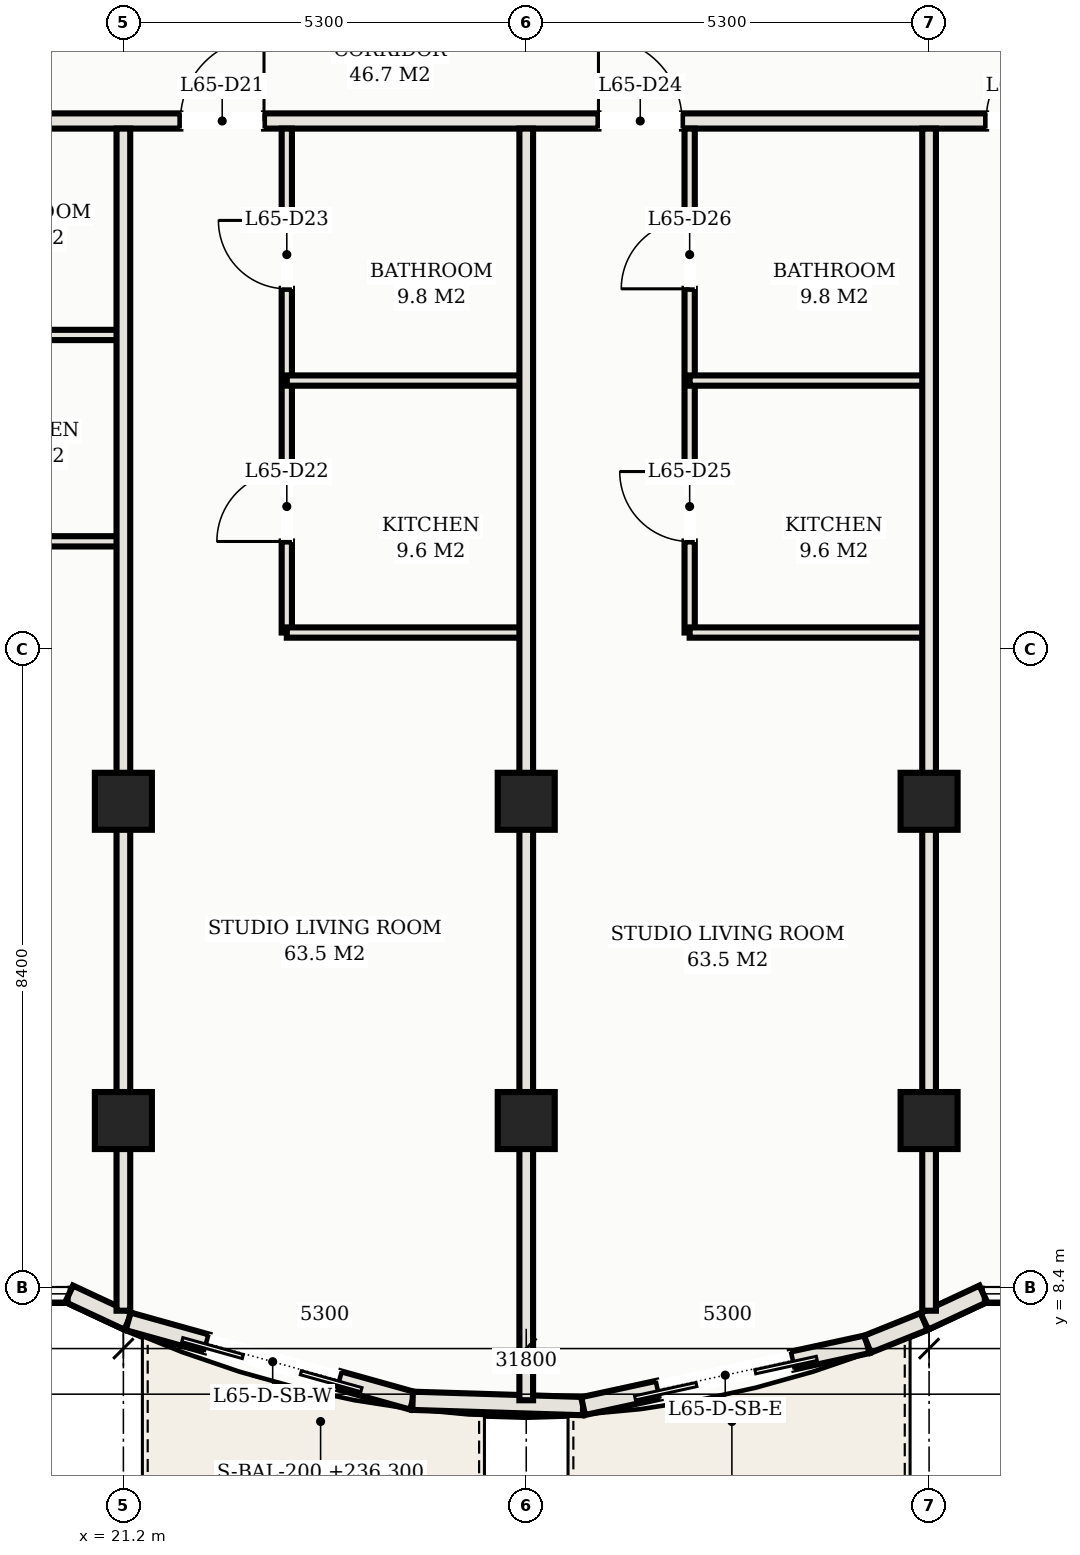
"""IFC4 building model, lengths in metres.
Left out: names, types, materials, properties, quantities, classifications, styles, units other than length and angle.
Written with IfcOpenShell. Run it as: python <this file> out.ifc"""

import sys

from ifc_helpers import new_model, si_unit, direction, frame, frame_2d, origin, origin_2d, place, context, subcontext, project, spatial, rectangle, hollow_rectangle, extrude, element, fill, save


model = new_model("IFC4")
c1 = context("Model", 3, precision=1e-05, world=origin(), true_north=direction((0.0, 1.0)))
c2 = subcontext(c1, "Body", "Model", "MODEL_VIEW")
j1 = project(units=[si_unit("LENGTHUNIT", "METRE"), si_unit("PLANEANGLEUNIT", "RADIAN")], contexts=[c1])
p1 = place(None, origin())
s1 = spatial("IfcSite", under=j1, at=p1, CompositionType="ELEMENT")
p2 = place(p1, origin())
s2 = spatial("IfcBuilding", under=s1, at=p2, CompositionType="ELEMENT")
p3 = place(p2, frame((0.0, 0.0, 236.3)))
s3 = spatial("IfcBuildingStorey", under=s2, at=p3, CompositionType="ELEMENT", Elevation=236.3)
for number, where, z_axis, x_axis in (
    (1, (21.2, 14.8, 0.0), (0.0, 0.0, 1.0), (1.0, 0.0, 0.0)),
    (2, (21.2, 10.6, 0.0), (0.0, 0.0, 1.0), (1.0, 0.0, 0.0)),
    (3, (26.5, 14.8, 0.0), (0.0, 0.0, 1.0), (1.0, 0.0, 0.0)),
    (4, (26.5, 10.6, 0.0), (0.0, 0.0, 1.0), (1.0, 0.0, 0.0)),
    (5, (31.8, 14.8, 0.0), (0.0, 0.0, 1.0), (1.0, 0.0, 0.0)),
    (6, (31.8, 10.6, 0.0), (0.0, 0.0, 1.0), (1.0, 0.0, 0.0)),
):
    element("IfcColumn", number, at=place(p3, frame(where, z_axis=z_axis, x_axis=x_axis)), inside=s3, PredefinedType="COLUMN", context=c2, shape_type="SweptSolid", body=[
        extrude(hollow_rectangle(XDim=0.75, YDim=0.75, WallThickness=0.025, at=origin_2d()), origin(), (0.0, 0.0, 1.0), 3.3),
    ])
p4 = place(p3, frame((20.487, 8.32, 0.0), z_axis=(0.0, 0.0, 1.0), x_axis=(0.906190424584, -0.422869855147, 0.0)))
e7 = element("IfcWall", 7, at=p4, inside=s3, PredefinedType="SOLIDWALL", context=c2, shape_type="SweptSolid", body=[
    extrude(rectangle(XDim=0.856, YDim=0.24, at=frame_2d((0.428, 0.0))), origin(), (0.0, 0.0, 1.0), 3.11),
])
p5 = place(p3, frame((21.263, 7.958, 0.0), z_axis=(0.0, 0.0, 1.0), x_axis=(0.963152398068, -0.268956238255, 0.0)))
e8 = element("IfcWall", 8, at=p5, inside=s3, PredefinedType="SOLIDWALL", context=c2, shape_type="SweptSolid", body=[
    extrude(rectangle(XDim=3.885, YDim=0.24, at=frame_2d((1.942, 0.0))), origin(), (0.0, 0.0, 1.0), 3.11),
])
p6 = place(p5, frame((1.074, 0.0, 0.0)))
e9 = element("IfcOpeningElement", 9, at=p6, cuts=e8, PredefinedType="OPENING", context=c2, shape_type="SweptSolid", body=[
    extrude(rectangle(XDim=1.8, YDim=2.2, at=frame_2d((0.9, 1.1))), frame((0.0, 0.13, 0.0), z_axis=(0.0, -1.0, 0.0), x_axis=(1.0, 0.0, 0.0)), (0.0, 0.0, 1.0), 0.26),
])
p7 = place(p3, frame((25.005, 6.913, 0.0), z_axis=(0.0, 0.0, 1.0), x_axis=(0.99951250052, -0.031221167572, 0.0)))
e10 = element("IfcWall", 10, at=p7, inside=s3, PredefinedType="SOLIDWALL", context=c2, shape_type="SweptSolid", body=[
    extrude(rectangle(XDim=2.244, YDim=0.24, at=frame_2d((1.122, 0.0))), origin(), (0.0, 0.0, 1.0), 3.11),
])
p8 = place(p3, frame((27.248, 6.843, 0.0), z_axis=(0.0, 0.0, 1.0), x_axis=(0.977126252677, 0.212660025225, 0.0)))
e11 = element("IfcWall", 11, at=p8, inside=s3, PredefinedType="SOLIDWALL", context=c2, shape_type="SweptSolid", body=[
    extrude(rectangle(XDim=3.828, YDim=0.24, at=frame_2d((1.914, 0.0))), origin(), (0.0, 0.0, 1.0), 3.11),
])
p9 = place(p8, frame((1.014, 0.0, 0.0)))
e12 = element("IfcOpeningElement", 12, at=p9, cuts=e11, PredefinedType="OPENING", context=c2, shape_type="SweptSolid", body=[
    extrude(rectangle(XDim=1.8, YDim=2.2, at=frame_2d((0.9, 1.1))), frame((0.0, 0.13, 0.0), z_axis=(0.0, -1.0, 0.0), x_axis=(1.0, 0.0, 0.0)), (0.0, 0.0, 1.0), 0.26),
])
p10 = place(p3, frame((30.988, 7.657, 0.0), z_axis=(0.0, 0.0, 1.0), x_axis=(0.927870589467, 0.372902358805, 0.0)))
e13 = element("IfcWall", 13, at=p10, inside=s3, PredefinedType="SOLIDWALL", context=c2, shape_type="SweptSolid", body=[
    extrude(rectangle(XDim=0.807, YDim=0.24, at=frame_2d((0.404, 0.0))), origin(), (0.0, 0.0, 1.0), 3.11),
])
p11 = place(p3, frame((31.737, 7.958, 0.0), z_axis=(0.0, 0.0, 1.0), x_axis=(0.906190424584, 0.422869855147, 0.0)))
e14 = element("IfcWall", 14, at=p11, inside=s3, PredefinedType="SOLIDWALL", context=c2, shape_type="SweptSolid", body=[
    extrude(rectangle(XDim=0.856, YDim=0.24, at=frame_2d((0.428, 0.0))), origin(), (0.0, 0.0, 1.0), 3.11),
])
p12 = place(p3, frame((8.6, 23.75, 0.0), z_axis=(0.0, 0.0, 1.0), x_axis=(1.0, 0.0, 0.0)))
e15 = element("IfcWall", 15, at=p12, inside=s3, PredefinedType="PARTITIONING", context=c2, shape_type="SweptSolid", body=[
    extrude(rectangle(XDim=35.8, YDim=0.2, at=frame_2d((17.9, 0.0))), origin(), (0.0, 0.0, 1.0), 2.45),
])
p13 = place(p12, frame((2.75, 0.0, 0.0)))
e16 = element("IfcOpeningElement", 16, at=p13, cuts=e15, PredefinedType="OPENING", context=c2, shape_type="SweptSolid", body=[
    extrude(rectangle(XDim=1.1, YDim=2.25, at=frame_2d((0.55, 1.125))), frame((0.0, 0.11, 0.0), z_axis=(0.0, -1.0, 0.0), x_axis=(1.0, 0.0, 0.0)), (0.0, 0.0, 1.0), 0.22),
])
p14 = place(p12, frame((8.05, 0.0, 0.0)))
e17 = element("IfcOpeningElement", 17, at=p14, cuts=e15, PredefinedType="OPENING", context=c2, shape_type="SweptSolid", body=[
    extrude(rectangle(XDim=1.1, YDim=2.25, at=frame_2d((0.55, 1.125))), frame((0.0, 0.11, 0.0), z_axis=(0.0, -1.0, 0.0), x_axis=(1.0, 0.0, 0.0)), (0.0, 0.0, 1.0), 0.22),
])
p15 = place(p12, frame((13.35, 0.0, 0.0)))
e18 = element("IfcOpeningElement", 18, at=p15, cuts=e15, PredefinedType="OPENING", context=c2, shape_type="SweptSolid", body=[
    extrude(rectangle(XDim=1.1, YDim=2.25, at=frame_2d((0.55, 1.125))), frame((0.0, 0.11, 0.0), z_axis=(0.0, -1.0, 0.0), x_axis=(1.0, 0.0, 0.0)), (0.0, 0.0, 1.0), 0.22),
])
p16 = place(p12, frame((18.85, 0.0, 0.0)))
e19 = element("IfcOpeningElement", 19, at=p16, cuts=e15, PredefinedType="OPENING", context=c2, shape_type="SweptSolid", body=[
    extrude(rectangle(XDim=1.1, YDim=2.25, at=frame_2d((0.55, 1.125))), frame((0.0, 0.11, 0.0), z_axis=(0.0, -1.0, 0.0), x_axis=(1.0, 0.0, 0.0)), (0.0, 0.0, 1.0), 0.22),
])
p17 = place(p12, frame((23.95, 0.0, 0.0)))
e20 = element("IfcOpeningElement", 20, at=p17, cuts=e15, PredefinedType="OPENING", context=c2, shape_type="SweptSolid", body=[
    extrude(rectangle(XDim=1.1, YDim=2.25, at=frame_2d((0.55, 1.125))), frame((0.0, 0.11, 0.0), z_axis=(0.0, -1.0, 0.0), x_axis=(1.0, 0.0, 0.0)), (0.0, 0.0, 1.0), 0.22),
])
p18 = place(p12, frame((29.25, 0.0, 0.0)))
e21 = element("IfcOpeningElement", 21, at=p18, cuts=e15, PredefinedType="OPENING", context=c2, shape_type="SweptSolid", body=[
    extrude(rectangle(XDim=1.1, YDim=2.25, at=frame_2d((0.55, 1.125))), frame((0.0, 0.11, 0.0), z_axis=(0.0, -1.0, 0.0), x_axis=(1.0, 0.0, 0.0)), (0.0, 0.0, 1.0), 0.22),
])
p19 = place(p12, frame((0.505, 0.0, 0.0)))
e22 = element("IfcOpeningElement", 22, at=p19, cuts=e15, PredefinedType="OPENING", context=c2, shape_type="SweptSolid", body=[
    extrude(rectangle(XDim=0.9, YDim=2.15, at=frame_2d((0.45, 1.075))), frame((0.0, 0.11, 0.0), z_axis=(0.0, -1.0, 0.0), x_axis=(1.0, 0.0, 0.0)), (0.0, 0.0, 1.0), 0.22),
])
p20 = place(p12, frame((34.395, 0.0, 0.0)))
e23 = element("IfcOpeningElement", 23, at=p20, cuts=e15, PredefinedType="OPENING", context=c2, shape_type="SweptSolid", body=[
    extrude(rectangle(XDim=0.9, YDim=2.15, at=frame_2d((0.45, 1.075))), frame((0.0, 0.11, 0.0), z_axis=(0.0, -1.0, 0.0), x_axis=(1.0, 0.0, 0.0)), (0.0, 0.0, 1.0), 0.22),
])
for number, where, z_axis, x_axis in (
    (24, (18.05, 18.22, 0.0), (0.0, 0.0, 1.0), (1.0, 0.0, 0.0)),
    (25, (18.05, 20.935, 0.0), (0.0, 0.0, 1.0), (1.0, 0.0, 0.0)),
):
    element("IfcWall", number, at=place(p3, frame(where, z_axis=z_axis, x_axis=x_axis)), inside=s3, PredefinedType="PARTITIONING", context=c2, shape_type="SweptSolid", body=[
        extrude(rectangle(XDim=3.15, YDim=0.135, at=frame_2d((1.575, 0.0))), origin(), (0.0, 0.0, 1.0), 2.45),
    ])
p21 = place(p3, frame((21.2, 8.098, 0.0), z_axis=(0.0, 0.0, 1.0), x_axis=(0.0, 1.0, 0.0)))
e26 = element("IfcWall", 26, at=p21, inside=s3, PredefinedType="PARTITIONING", context=c2, shape_type="SweptSolid", body=[
    extrude(rectangle(XDim=15.552, YDim=0.18, at=frame_2d((7.776, 0.0))), origin(), (0.0, 0.0, 1.0), 2.45),
])
p22 = place(p3, frame((23.35, 17.02, 0.0), z_axis=(0.0, 0.0, 1.0), x_axis=(0.0, 1.0, 0.0)))
e27 = element("IfcWall", 27, at=p22, inside=s3, PredefinedType="PARTITIONING", context=c2, shape_type="SweptSolid", body=[
    extrude(rectangle(XDim=6.63, YDim=0.135, at=frame_2d((3.315, 0.0))), origin(), (0.0, 0.0, 1.0), 2.45),
])
p23 = place(p22, frame((1.198, 0.0, 0.0)))
e28 = element("IfcOpeningElement", 28, at=p23, cuts=e27, PredefinedType="OPENING", context=c2, shape_type="SweptSolid", body=[
    extrude(rectangle(XDim=0.92, YDim=2.15, at=frame_2d((0.46, 1.075))), frame((0.0, 0.078, 0.0), z_axis=(0.0, -1.0, 0.0), x_axis=(1.0, 0.0, 0.0)), (0.0, 0.0, 1.0), 0.155),
])
p24 = place(p22, frame((4.522, 0.0, 0.0)))
e29 = element("IfcOpeningElement", 29, at=p24, cuts=e27, PredefinedType="OPENING", context=c2, shape_type="SweptSolid", body=[
    extrude(rectangle(XDim=0.9, YDim=2.15, at=frame_2d((0.45, 1.075))), frame((0.0, 0.078, 0.0), z_axis=(0.0, -1.0, 0.0), x_axis=(1.0, 0.0, 0.0)), (0.0, 0.0, 1.0), 0.155),
])
for number, where, z_axis, x_axis in (
    (30, (23.35, 17.02, 0.0), (0.0, 0.0, 1.0), (1.0, 0.0, 0.0)),
    (31, (23.35, 20.335, 0.0), (0.0, 0.0, 1.0), (1.0, 0.0, 0.0)),
):
    element("IfcWall", number, at=place(p3, frame(where, z_axis=z_axis, x_axis=x_axis)), inside=s3, PredefinedType="PARTITIONING", context=c2, shape_type="SweptSolid", body=[
        extrude(rectangle(XDim=3.15, YDim=0.135, at=frame_2d((1.575, 0.0))), origin(), (0.0, 0.0, 1.0), 2.45),
    ])
p25 = place(p3, frame((26.5, 6.92, 0.0), z_axis=(0.0, 0.0, 1.0), x_axis=(0.0, 1.0, 0.0)))
e32 = element("IfcWall", 32, at=p25, inside=s3, PredefinedType="PARTITIONING", context=c2, shape_type="SweptSolid", body=[
    extrude(rectangle(XDim=16.73, YDim=0.18, at=frame_2d((8.365, 0.0))), origin(), (0.0, 0.0, 1.0), 2.45),
])
p26 = place(p3, frame((28.65, 17.02, 0.0), z_axis=(0.0, 0.0, 1.0), x_axis=(0.0, 1.0, 0.0)))
e33 = element("IfcWall", 33, at=p26, inside=s3, PredefinedType="PARTITIONING", context=c2, shape_type="SweptSolid", body=[
    extrude(rectangle(XDim=6.63, YDim=0.135, at=frame_2d((3.315, 0.0))), origin(), (0.0, 0.0, 1.0), 2.45),
])
p27 = place(p26, frame((1.198, 0.0, 0.0)))
e34 = element("IfcOpeningElement", 34, at=p27, cuts=e33, PredefinedType="OPENING", context=c2, shape_type="SweptSolid", body=[
    extrude(rectangle(XDim=0.92, YDim=2.15, at=frame_2d((0.46, 1.075))), frame((0.0, 0.078, 0.0), z_axis=(0.0, -1.0, 0.0), x_axis=(1.0, 0.0, 0.0)), (0.0, 0.0, 1.0), 0.155),
])
p28 = place(p26, frame((4.522, 0.0, 0.0)))
e35 = element("IfcOpeningElement", 35, at=p28, cuts=e33, PredefinedType="OPENING", context=c2, shape_type="SweptSolid", body=[
    extrude(rectangle(XDim=0.9, YDim=2.15, at=frame_2d((0.45, 1.075))), frame((0.0, 0.078, 0.0), z_axis=(0.0, -1.0, 0.0), x_axis=(1.0, 0.0, 0.0)), (0.0, 0.0, 1.0), 0.155),
])
for number, where, z_axis, x_axis in (
    (36, (28.65, 17.02, 0.0), (0.0, 0.0, 1.0), (1.0, 0.0, 0.0)),
    (37, (28.65, 20.335, 0.0), (0.0, 0.0, 1.0), (1.0, 0.0, 0.0)),
):
    element("IfcWall", number, at=place(p3, frame(where, z_axis=z_axis, x_axis=x_axis)), inside=s3, PredefinedType="PARTITIONING", context=c2, shape_type="SweptSolid", body=[
        extrude(rectangle(XDim=3.15, YDim=0.135, at=frame_2d((1.575, 0.0))), origin(), (0.0, 0.0, 1.0), 2.45),
    ])
p29 = place(p3, frame((31.8, 8.098, 0.0), z_axis=(0.0, 0.0, 1.0), x_axis=(0.0, 1.0, 0.0)))
e38 = element("IfcWall", 38, at=p29, inside=s3, PredefinedType="PARTITIONING", context=c2, shape_type="SweptSolid", body=[
    extrude(rectangle(XDim=15.552, YDim=0.18, at=frame_2d((7.776, 0.0))), origin(), (0.0, 0.0, 1.0), 2.45),
])
p30 = place(p6, frame((1.8, 0.0, 0.0), z_axis=(0.0, 0.0, 1.0), x_axis=(-1.0, 0.0, 0.0)))
e39 = element("IfcDoor", 39, at=p30, inside=s3, OperationType="DOUBLE_DOOR_SLIDING", PredefinedType="DOOR", context=c2, shape_type="SweptSolid", body=[
    extrude(rectangle(XDim=1.8, YDim=2.2, at=frame_2d((0.9, 1.1))), frame((0.0, 0.025, 0.0), z_axis=(0.0, -1.0, 0.0), x_axis=(1.0, 0.0, 0.0)), (0.0, 0.0, 1.0), 0.05),
])
fill(e9, e39)
p31 = place(p9, frame((1.8, 0.0, 0.0), z_axis=(0.0, 0.0, 1.0), x_axis=(-1.0, 0.0, 0.0)))
e40 = element("IfcDoor", 40, at=p31, inside=s3, OperationType="DOUBLE_DOOR_SLIDING", PredefinedType="DOOR", context=c2, shape_type="SweptSolid", body=[
    extrude(rectangle(XDim=1.8, YDim=2.2, at=frame_2d((0.9, 1.1))), frame((0.0, 0.025, 0.0), z_axis=(0.0, -1.0, 0.0), x_axis=(1.0, 0.0, 0.0)), (0.0, 0.0, 1.0), 0.05),
])
fill(e12, e40)
p32 = place(p15, origin())
e41 = element("IfcDoor", 41, at=p32, inside=s3, OperationType="SINGLE_SWING_RIGHT", PredefinedType="DOOR", context=c2, shape_type="SweptSolid", body=[
    extrude(rectangle(XDim=1.1, YDim=2.25, at=frame_2d((0.55, 1.125))), frame((0.0, 0.025, 0.0), z_axis=(0.0, -1.0, 0.0), x_axis=(1.0, 0.0, 0.0)), (0.0, 0.0, 1.0), 0.05),
])
fill(e18, e41)
p33 = place(p23, origin())
e42 = element("IfcDoor", 42, at=p33, inside=s3, OperationType="SINGLE_SWING_LEFT", PredefinedType="DOOR", context=c2, shape_type="SweptSolid", body=[
    extrude(rectangle(XDim=0.92, YDim=2.15, at=frame_2d((0.46, 1.075))), frame((0.0, 0.025, 0.0), z_axis=(0.0, -1.0, 0.0), x_axis=(1.0, 0.0, 0.0)), (0.0, 0.0, 1.0), 0.05),
])
fill(e28, e42)
p34 = place(p24, origin())
e43 = element("IfcDoor", 43, at=p34, inside=s3, OperationType="SINGLE_SWING_RIGHT", PredefinedType="DOOR", context=c2, shape_type="SweptSolid", body=[
    extrude(rectangle(XDim=0.9, YDim=2.15, at=frame_2d((0.45, 1.075))), frame((0.0, 0.025, 0.0), z_axis=(0.0, -1.0, 0.0), x_axis=(1.0, 0.0, 0.0)), (0.0, 0.0, 1.0), 0.05),
])
fill(e29, e43)
p35 = place(p16, origin())
e44 = element("IfcDoor", 44, at=p35, inside=s3, OperationType="SINGLE_SWING_LEFT", PredefinedType="DOOR", context=c2, shape_type="SweptSolid", body=[
    extrude(rectangle(XDim=1.1, YDim=2.25, at=frame_2d((0.55, 1.125))), frame((0.0, 0.025, 0.0), z_axis=(0.0, -1.0, 0.0), x_axis=(1.0, 0.0, 0.0)), (0.0, 0.0, 1.0), 0.05),
])
fill(e19, e44)
p36 = place(p27, origin())
e45 = element("IfcDoor", 45, at=p36, inside=s3, OperationType="SINGLE_SWING_RIGHT", PredefinedType="DOOR", context=c2, shape_type="SweptSolid", body=[
    extrude(rectangle(XDim=0.92, YDim=2.15, at=frame_2d((0.46, 1.075))), frame((0.0, 0.025, 0.0), z_axis=(0.0, -1.0, 0.0), x_axis=(1.0, 0.0, 0.0)), (0.0, 0.0, 1.0), 0.05),
])
fill(e34, e45)
p37 = place(p28, origin())
e46 = element("IfcDoor", 46, at=p37, inside=s3, OperationType="SINGLE_SWING_LEFT", PredefinedType="DOOR", context=c2, shape_type="SweptSolid", body=[
    extrude(rectangle(XDim=0.9, YDim=2.15, at=frame_2d((0.45, 1.075))), frame((0.0, 0.025, 0.0), z_axis=(0.0, -1.0, 0.0), x_axis=(1.0, 0.0, 0.0)), (0.0, 0.0, 1.0), 0.05),
])
fill(e35, e46)
p38 = place(p17, origin())
e47 = element("IfcDoor", 47, at=p38, inside=s3, OperationType="SINGLE_SWING_RIGHT", PredefinedType="DOOR", context=c2, shape_type="SweptSolid", body=[
    extrude(rectangle(XDim=1.1, YDim=2.25, at=frame_2d((0.55, 1.125))), frame((0.0, 0.025, 0.0), z_axis=(0.0, -1.0, 0.0), x_axis=(1.0, 0.0, 0.0)), (0.0, 0.0, 1.0), 0.05),
])
fill(e20, e47)
save(model, sys.argv[1])
